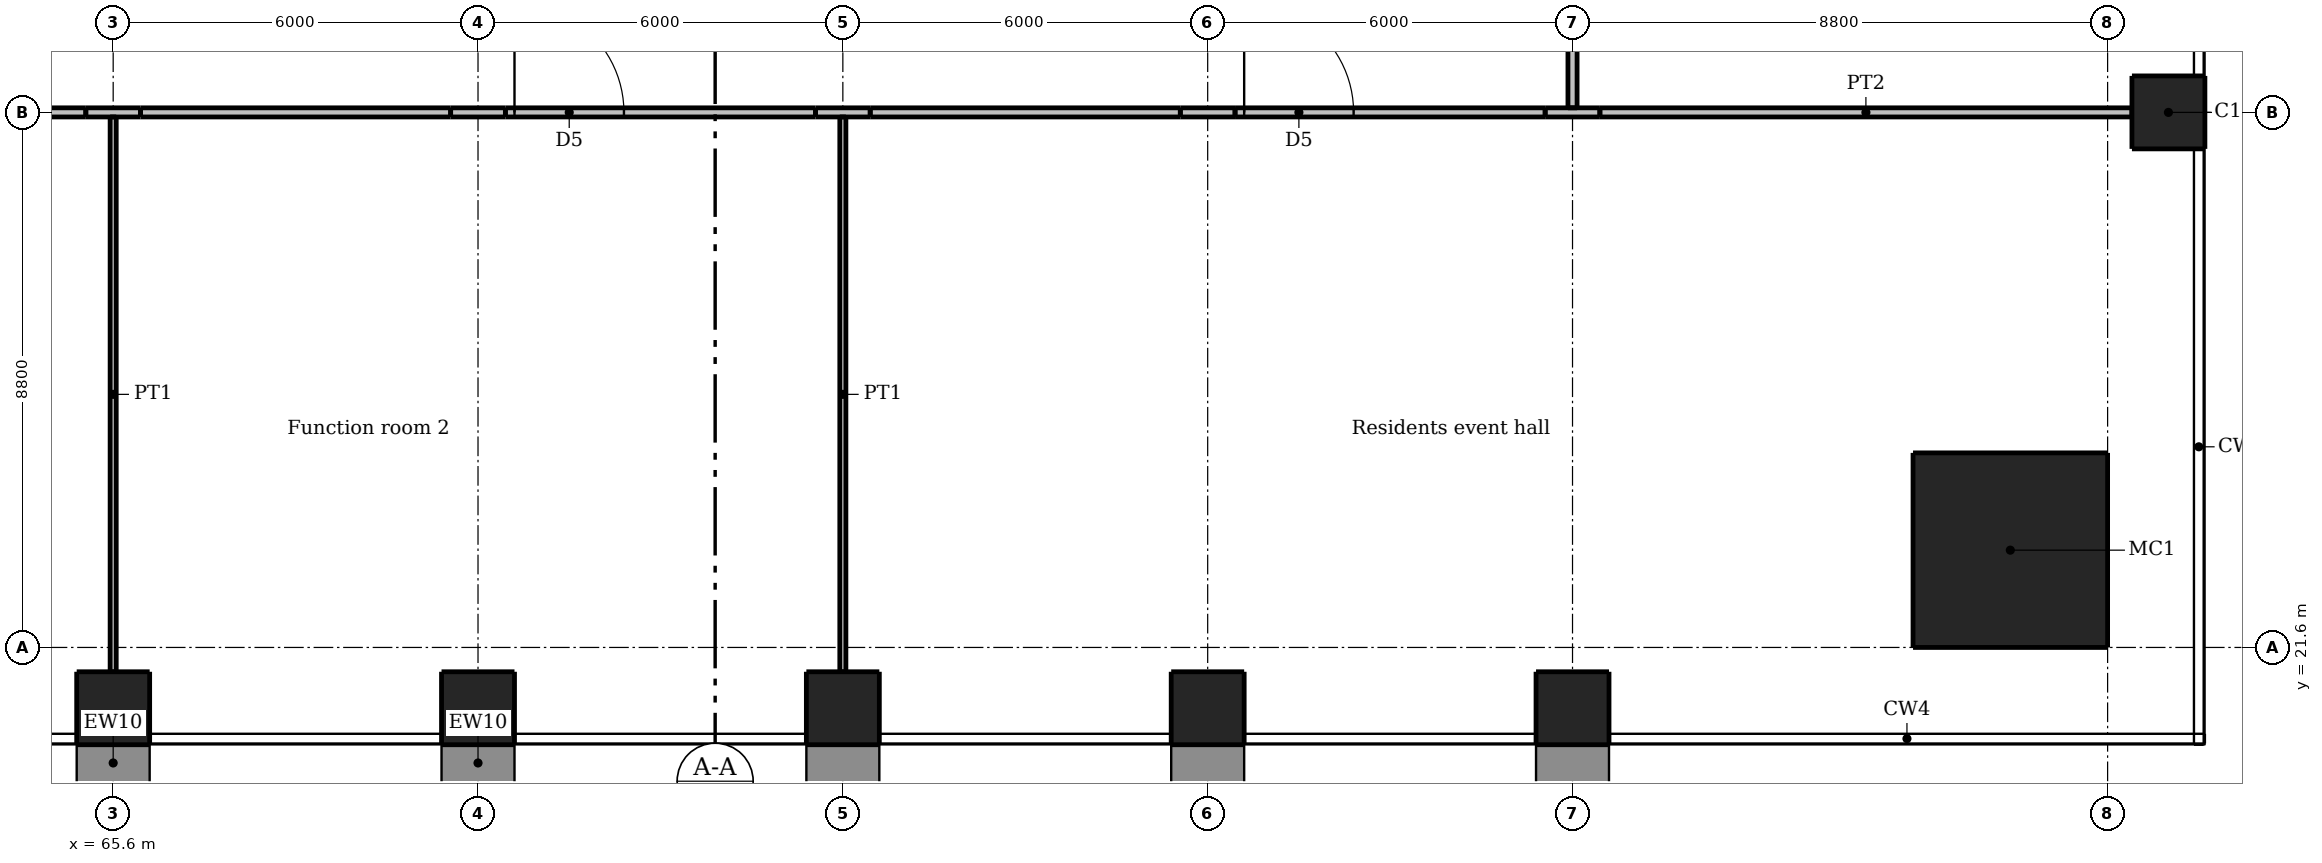
"""IFC4 building model, lengths in metres.
Left out: names, types, materials, properties, quantities, classifications, styles, units other than length and angle.
Written with IfcOpenShell. Run it as: python <this file> out.ifc"""

import sys

from ifc_helpers import new_model, si_unit, direction, frame, frame_2d, origin, origin_2d, place, context, subcontext, project, spatial, rectangle, extrude, element, fill, save


model = new_model("IFC4")
c1 = context("Model", 3, precision=1e-05, world=origin(), true_north=direction((0.0, 1.0)))
c2 = subcontext(c1, "Body", "Model", "MODEL_VIEW")
j1 = project(units=[si_unit("LENGTHUNIT", "METRE"), si_unit("PLANEANGLEUNIT", "RADIAN")], contexts=[c1])
p1 = place(None, origin())
s1 = spatial("IfcSite", under=j1, at=p1, CompositionType="ELEMENT")
p2 = place(p1, origin())
s2 = spatial("IfcBuilding", under=s1, at=p2, CompositionType="ELEMENT")
p3 = place(p2, frame((0.0, 0.0, 19.0)))
s3 = spatial("IfcBuildingStorey", under=s2, at=p3, CompositionType="ELEMENT", Elevation=19.0)
p4 = place(p3, frame((65.6, 20.6, 0.0), z_axis=(0.0, 0.0, 1.0), x_axis=(1.0, 0.0, 0.0)))
e1 = element("IfcColumn", 1, at=p4, inside=s3, PredefinedType="COLUMN", context=c2, shape_type="SweptSolid", body=[
    extrude(rectangle(XDim=1.2, YDim=1.2, at=origin_2d()), origin(), (0.0, 0.0, 1.0), 4.25),
])
for number, where, z_axis, x_axis in (
    (2, (71.6, 20.6, 0.0), (0.0, 0.0, 1.0), (1.0, 0.0, 0.0)),
    (3, (77.6, 20.6, 0.0), (0.0, 0.0, 1.0), (1.0, 0.0, 0.0)),
    (4, (83.6, 20.6, 0.0), (0.0, 0.0, 1.0), (1.0, 0.0, 0.0)),
):
    element("IfcColumn", number, at=place(p3, frame(where, z_axis=z_axis, x_axis=x_axis)), inside=s3, PredefinedType="COLUMN", context=c2, shape_type="SweptSolid", body=[
        extrude(rectangle(XDim=1.2, YDim=1.2, at=origin_2d()), origin(), (0.0, 0.0, 1.0), 4.5),
    ])
for number, where, z_axis, x_axis in (
    (5, (89.6, 20.6, 0.0), (0.0, 0.0, 1.0), (1.0, 0.0, 0.0)),
    (6, (99.4, 30.4, 0.0), (0.0, 0.0, 1.0), (1.0, 0.0, 0.0)),
):
    element("IfcColumn", number, at=place(p3, frame(where, z_axis=z_axis, x_axis=x_axis)), inside=s3, PredefinedType="COLUMN", context=c2, shape_type="SweptSolid", body=[
        extrude(rectangle(XDim=1.2, YDim=1.2, at=origin_2d()), origin(), (0.0, 0.0, 1.0), 4.25),
    ])
p5 = place(p3, frame((96.8, 23.2, 0.0), z_axis=(0.0, 0.0, 1.0), x_axis=(1.0, 0.0, 0.0)))
e7 = element("IfcColumn", 7, at=p5, inside=s3, PredefinedType="COLUMN", context=c2, shape_type="SweptSolid", body=[
    extrude(rectangle(XDim=3.2, YDim=3.2, at=origin_2d()), origin(), (0.0, 0.0, 1.0), 4.25),
])
p6 = place(p3, frame((60.05, 30.4, 0.0), z_axis=(0.0, 0.0, 1.0), x_axis=(1.0, 0.0, 0.0)))
e8 = element("IfcWall", 8, at=p6, inside=s3, PredefinedType="PARTITIONING", context=c2, shape_type="SweptSolid", body=[
    extrude(rectangle(XDim=5.1, YDim=0.15, at=frame_2d((2.55, 0.0))), origin(), (0.0, 0.0, 1.0), 4.25),
])
p7 = place(p6, frame((1.65, 0.0, 0.0)))
e9 = element("IfcOpeningElement", 9, at=p7, cuts=e8, PredefinedType="OPENING", context=c2, shape_type="SweptSolid", body=[
    extrude(rectangle(XDim=1.8, YDim=2.1, at=frame_2d((0.9, 1.05))), frame((0.0, 0.085, 0.0), z_axis=(0.0, -1.0, 0.0), x_axis=(1.0, 0.0, 0.0)), (0.0, 0.0, 1.0), 0.17),
])
p8 = place(p3, frame((65.15, 30.4, 0.0), z_axis=(0.0, 0.0, 1.0), x_axis=(1.0, 0.0, 0.0)))
e10 = element("IfcWall", 10, at=p8, inside=s3, PredefinedType="PARTITIONING", context=c2, shape_type="SweptSolid", body=[
    extrude(rectangle(XDim=0.9, YDim=0.15, at=frame_2d((0.45, 0.0))), origin(), (0.0, 0.0, 1.0), 2.95),
])
p9 = place(p3, frame((66.05, 30.4, 0.0), z_axis=(0.0, 0.0, 1.0), x_axis=(1.0, 0.0, 0.0)))
e11 = element("IfcWall", 11, at=p9, inside=s3, PredefinedType="PARTITIONING", context=c2, shape_type="SweptSolid", body=[
    extrude(rectangle(XDim=5.1, YDim=0.15, at=frame_2d((2.55, 0.0))), origin(), (0.0, 0.0, 1.0), 4.25),
])
p10 = place(p3, frame((71.15, 30.4, 0.0), z_axis=(0.0, 0.0, 1.0), x_axis=(1.0, 0.0, 0.0)))
e12 = element("IfcWall", 12, at=p10, inside=s3, PredefinedType="PARTITIONING", context=c2, shape_type="SweptSolid", body=[
    extrude(rectangle(XDim=0.9, YDim=0.15, at=frame_2d((0.45, 0.0))), origin(), (0.0, 0.0, 1.0), 2.95),
])
p11 = place(p3, frame((72.05, 30.4, 0.0), z_axis=(0.0, 0.0, 1.0), x_axis=(1.0, 0.0, 0.0)))
e13 = element("IfcWall", 13, at=p11, inside=s3, PredefinedType="PARTITIONING", context=c2, shape_type="SweptSolid", body=[
    extrude(rectangle(XDim=5.1, YDim=0.15, at=frame_2d((2.55, 0.0))), origin(), (0.0, 0.0, 1.0), 4.25),
])
p12 = place(p11, frame((0.15, 0.0, 0.0)))
e14 = element("IfcOpeningElement", 14, at=p12, cuts=e13, PredefinedType="OPENING", context=c2, shape_type="SweptSolid", body=[
    extrude(rectangle(XDim=1.8, YDim=2.1, at=frame_2d((0.9, 1.05))), frame((0.0, 0.085, 0.0), z_axis=(0.0, -1.0, 0.0), x_axis=(1.0, 0.0, 0.0)), (0.0, 0.0, 1.0), 0.17),
])
p13 = place(p3, frame((77.15, 30.4, 0.0), z_axis=(0.0, 0.0, 1.0), x_axis=(1.0, 0.0, 0.0)))
e15 = element("IfcWall", 15, at=p13, inside=s3, PredefinedType="PARTITIONING", context=c2, shape_type="SweptSolid", body=[
    extrude(rectangle(XDim=0.9, YDim=0.15, at=frame_2d((0.45, 0.0))), origin(), (0.0, 0.0, 1.0), 2.95),
])
p14 = place(p3, frame((78.05, 30.4, 0.0), z_axis=(0.0, 0.0, 1.0), x_axis=(1.0, 0.0, 0.0)))
e16 = element("IfcWall", 16, at=p14, inside=s3, PredefinedType="PARTITIONING", context=c2, shape_type="SweptSolid", body=[
    extrude(rectangle(XDim=5.1, YDim=0.15, at=frame_2d((2.55, 0.0))), origin(), (0.0, 0.0, 1.0), 4.25),
])
p15 = place(p3, frame((83.15, 30.4, 0.0), z_axis=(0.0, 0.0, 1.0), x_axis=(1.0, 0.0, 0.0)))
e17 = element("IfcWall", 17, at=p15, inside=s3, PredefinedType="PARTITIONING", context=c2, shape_type="SweptSolid", body=[
    extrude(rectangle(XDim=0.9, YDim=0.15, at=frame_2d((0.45, 0.0))), origin(), (0.0, 0.0, 1.0), 2.95),
])
p16 = place(p3, frame((84.05, 30.4, 0.0), z_axis=(0.0, 0.0, 1.0), x_axis=(1.0, 0.0, 0.0)))
e18 = element("IfcWall", 18, at=p16, inside=s3, PredefinedType="PARTITIONING", context=c2, shape_type="SweptSolid", body=[
    extrude(rectangle(XDim=5.1, YDim=0.15, at=frame_2d((2.55, 0.0))), origin(), (0.0, 0.0, 1.0), 4.25),
])
p17 = place(p16, frame((0.15, 0.0, 0.0)))
e19 = element("IfcOpeningElement", 19, at=p17, cuts=e18, PredefinedType="OPENING", context=c2, shape_type="SweptSolid", body=[
    extrude(rectangle(XDim=1.8, YDim=2.1, at=frame_2d((0.9, 1.05))), frame((0.0, 0.085, 0.0), z_axis=(0.0, -1.0, 0.0), x_axis=(1.0, 0.0, 0.0)), (0.0, 0.0, 1.0), 0.17),
])
p18 = place(p3, frame((89.15, 30.4, 0.0), z_axis=(0.0, 0.0, 1.0), x_axis=(1.0, 0.0, 0.0)))
e20 = element("IfcWall", 20, at=p18, inside=s3, PredefinedType="PARTITIONING", context=c2, shape_type="SweptSolid", body=[
    extrude(rectangle(XDim=0.9, YDim=0.15, at=frame_2d((0.45, 0.0))), origin(), (0.0, 0.0, 1.0), 2.947),
])
p19 = place(p3, frame((90.05, 30.4, 0.0), z_axis=(0.0, 0.0, 1.0), x_axis=(1.0, 0.0, 0.0)))
e21 = element("IfcWall", 21, at=p19, inside=s3, PredefinedType="PARTITIONING", context=c2, shape_type="SweptSolid", body=[
    extrude(rectangle(XDim=8.75, YDim=0.15, at=frame_2d((4.375, 0.0))), origin(), (0.0, 0.0, 1.0), 3.415),
])
for number, where, z_axis, x_axis in (
    (22, (65.6, 21.2, 0.0), (0.0, 0.0, 1.0), (0.0, 1.0, 0.0)),
    (23, (77.6, 21.2, 0.0), (0.0, 0.0, 1.0), (0.0, 1.0, 0.0)),
):
    element("IfcWall", number, at=place(p3, frame(where, z_axis=z_axis, x_axis=x_axis)), inside=s3, PredefinedType="PARTITIONING", context=c2, shape_type="SweptSolid", body=[
        extrude(rectangle(XDim=9.125, YDim=0.1, at=frame_2d((4.562, 0.0))), origin(), (0.0, 0.0, 1.0), 2.95),
    ])
p20 = place(p3, frame((89.6, 30.475, 0.0), z_axis=(0.0, 0.0, 1.0), x_axis=(0.0, 1.0, 0.0)))
e24 = element("IfcWall", 24, at=p20, inside=s3, PredefinedType="PARTITIONING", context=c2, shape_type="SweptSolid", body=[
    extrude(rectangle(XDim=5.475, YDim=0.15, at=frame_2d((2.737, 0.0))), origin(), (0.0, 0.0, 1.0), 2.947),
])
p21 = place(p12, origin())
e25 = element("IfcDoor", 25, at=p21, inside=s3, OperationType="DOUBLE_DOOR_SINGLE_SWING", PredefinedType="DOOR", context=c2, shape_type="SweptSolid", body=[
    extrude(rectangle(XDim=1.8, YDim=2.1, at=frame_2d((0.9, 1.05))), frame((0.0, 0.025, 0.0), z_axis=(0.0, -1.0, 0.0), x_axis=(1.0, 0.0, 0.0)), (0.0, 0.0, 1.0), 0.05),
])
fill(e14, e25)
p22 = place(p17, origin())
e26 = element("IfcDoor", 26, at=p22, inside=s3, OperationType="DOUBLE_DOOR_SINGLE_SWING", PredefinedType="DOOR", context=c2, shape_type="SweptSolid", body=[
    extrude(rectangle(XDim=1.8, YDim=2.1, at=frame_2d((0.9, 1.05))), frame((0.0, 0.025, 0.0), z_axis=(0.0, -1.0, 0.0), x_axis=(1.0, 0.0, 0.0)), (0.0, 0.0, 1.0), 0.05),
])
fill(e19, e26)
save(model, sys.argv[1])
